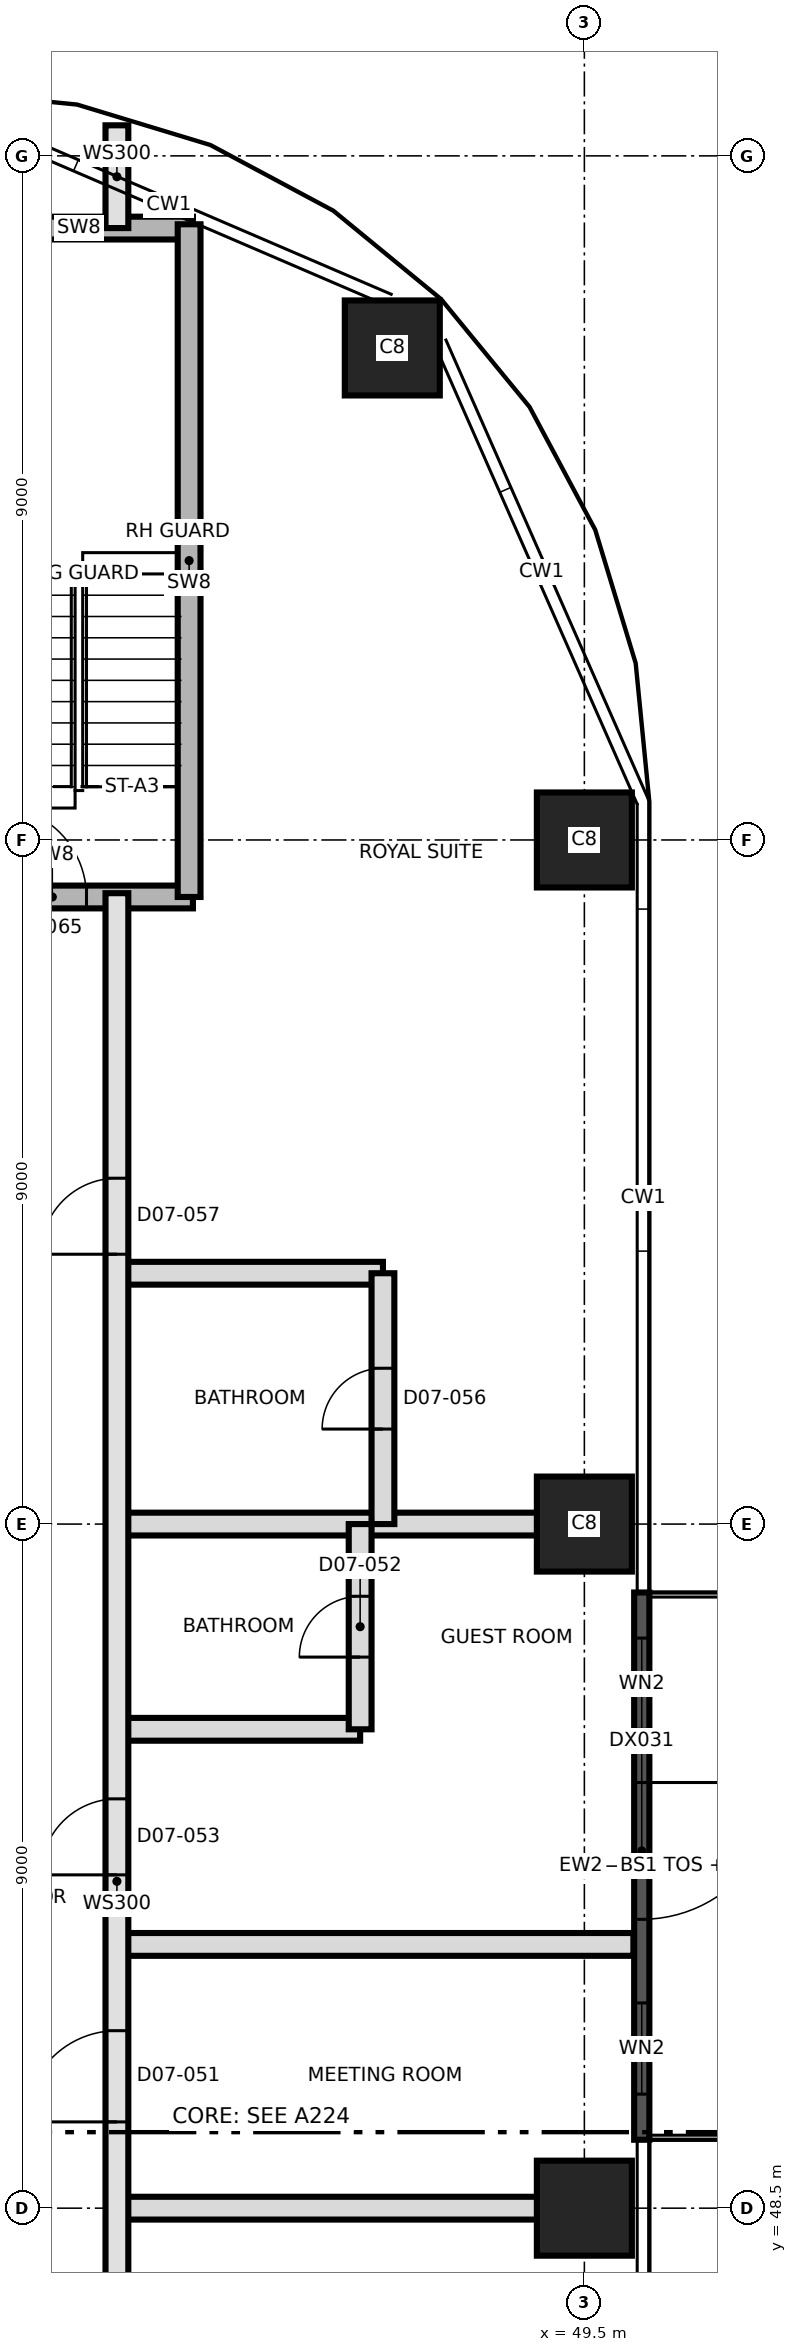
"""IFC4 building model, lengths in metres.
Left out: names, types, materials, properties, quantities, classifications, styles, units other than length and angle.
Written with IfcOpenShell. Run it as: python <this file> out.ifc"""

import sys

from ifc_helpers import new_model, si_unit, direction, frame, frame_2d, origin, origin_2d, place, context, subcontext, project, spatial, rectangle, extrude, element, fill, save


model = new_model("IFC4")
c1 = context("Model", 3, precision=1e-05, world=origin(), true_north=direction((0.0, 1.0)))
c2 = subcontext(c1, "Body", "Model", "MODEL_VIEW")
j1 = project(units=[si_unit("LENGTHUNIT", "METRE"), si_unit("PLANEANGLEUNIT", "RADIAN")], contexts=[c1])
p1 = place(None, origin())
s1 = spatial("IfcSite", under=j1, at=p1, CompositionType="ELEMENT")
p2 = place(p1, origin())
s2 = spatial("IfcBuilding", under=s1, at=p2, CompositionType="ELEMENT")
p3 = place(p2, frame((0.0, 0.0, 90.8)))
s3 = spatial("IfcBuildingStorey", under=s2, at=p3, CompositionType="ELEMENT", Elevation=90.8)
for number, where, z_axis, x_axis in (
    (1, (49.5, 48.5, 0.0), (0.0, 0.0, 1.0), (1.0, 0.0, 0.0)),
    (2, (49.5, 57.5, 0.0), (0.0, 0.0, 1.0), (1.0, 0.0, 0.0)),
    (3, (49.5, 66.5, 0.0), (0.0, 0.0, 1.0), (1.0, 0.0, 0.0)),
    (4, (46.973, 72.973, 0.0), (0.0, 0.0, 1.0), (1.0, 0.0, 0.0)),
):
    element("IfcColumn", number, at=place(p3, frame(where, z_axis=z_axis, x_axis=x_axis)), inside=s3, PredefinedType="COLUMN", context=c2, shape_type="SweptSolid", body=[
        extrude(rectangle(XDim=1.25, YDim=1.25, at=origin_2d()), origin(), (0.0, 0.0, 1.0), 3.7),
    ])
p4 = place(p3, frame((50.255, 56.6, 0.0), z_axis=(0.0, 0.0, 1.0), x_axis=(0.0, -1.0, 0.0)))
e5 = element("IfcWall", 5, at=p4, inside=s3, PredefinedType="SOLIDWALL", context=c2, shape_type="SweptSolid", body=[
    extrude(rectangle(XDim=7.2, YDim=0.2, at=frame_2d((3.6, 0.0))), origin(), (0.0, 0.0, 1.0), 3.4),
])
p5 = place(p4, frame((2.5, 0.0, 0.0)))
e6 = element("IfcOpeningElement", 6, at=p5, cuts=e5, PredefinedType="OPENING", context=c2, shape_type="SweptSolid", body=[
    extrude(rectangle(XDim=1.8, YDim=2.4, at=frame_2d((0.9, 1.2))), frame((0.0, 0.11, 0.0), z_axis=(0.0, -1.0, 0.0), x_axis=(1.0, 0.0, 0.0)), (0.0, 0.0, 1.0), 0.22),
])
p6 = place(p4, frame((5.4, 0.0, 0.9)))
e7 = element("IfcOpeningElement", 7, at=p6, cuts=e5, PredefinedType="OPENING", context=c2, shape_type="SweptSolid", body=[
    extrude(rectangle(XDim=1.2, YDim=2.1, at=frame_2d((0.6, 1.05))), frame((0.0, 0.11, 0.0), z_axis=(0.0, -1.0, 0.0), x_axis=(1.0, 0.0, 0.0)), (0.0, 0.0, 1.0), 0.22),
])
p7 = place(p4, frame((0.6, 0.0, 0.9)))
e8 = element("IfcOpeningElement", 8, at=p7, cuts=e5, PredefinedType="OPENING", context=c2, shape_type="SweptSolid", body=[
    extrude(rectangle(XDim=1.2, YDim=2.1, at=frame_2d((0.6, 1.05))), frame((0.0, 0.11, 0.0), z_axis=(0.0, -1.0, 0.0), x_axis=(1.0, 0.0, 0.0)), (0.0, 0.0, 1.0), 0.22),
])
p8 = place(p3, frame((43.35, 48.5, 0.0), z_axis=(0.0, 0.0, 1.0), x_axis=(1.0, 0.0, 0.0)))
e9 = element("IfcWall", 9, at=p8, inside=s3, PredefinedType="PARTITIONING", context=c2, shape_type="SweptSolid", body=[
    extrude(rectangle(XDim=6.655, YDim=0.3, at=frame_2d((3.327, 0.0))), origin(), (0.0, 0.0, 1.0), 3.4),
])
p9 = place(p3, frame((43.35, 51.97, 0.0), z_axis=(0.0, 0.0, 1.0), x_axis=(1.0, 0.0, 0.0)))
e10 = element("IfcWall", 10, at=p9, inside=s3, PredefinedType="PARTITIONING", context=c2, shape_type="SweptSolid", body=[
    extrude(rectangle(XDim=6.795, YDim=0.3, at=frame_2d((3.397, 0.0))), origin(), (0.0, 0.0, 1.0), 3.4),
])
p10 = place(p3, frame((43.35, 54.8, 0.0), z_axis=(0.0, 0.0, 1.0), x_axis=(1.0, 0.0, 0.0)))
e11 = element("IfcWall", 11, at=p10, inside=s3, PredefinedType="PARTITIONING", context=c2, shape_type="SweptSolid", body=[
    extrude(rectangle(XDim=3.2, YDim=0.3, at=frame_2d((1.6, 0.0))), origin(), (0.0, 0.0, 1.0), 3.4),
])
p11 = place(p3, frame((43.35, 57.5, 0.0), z_axis=(0.0, 0.0, 1.0), x_axis=(1.0, 0.0, 0.0)))
e12 = element("IfcWall", 12, at=p11, inside=s3, PredefinedType="PARTITIONING", context=c2, shape_type="SweptSolid", body=[
    extrude(rectangle(XDim=6.655, YDim=0.3, at=frame_2d((3.327, 0.0))), origin(), (0.0, 0.0, 1.0), 3.4),
])
p12 = place(p3, frame((43.35, 60.8, 0.0), z_axis=(0.0, 0.0, 1.0), x_axis=(1.0, 0.0, 0.0)))
e13 = element("IfcWall", 13, at=p12, inside=s3, PredefinedType="PARTITIONING", context=c2, shape_type="SweptSolid", body=[
    extrude(rectangle(XDim=3.5, YDim=0.3, at=frame_2d((1.75, 0.0))), origin(), (0.0, 0.0, 1.0), 3.4),
])
p13 = place(p3, frame((40.65, 65.75, 0.0), z_axis=(0.0, 0.0, 1.0), x_axis=(1.0, 0.0, 0.0)))
e14 = element("IfcWall", 14, at=p13, inside=s3, PredefinedType="SHEAR", context=c2, shape_type="SweptSolid", body=[
    extrude(rectangle(XDim=3.7, YDim=0.3, at=frame_2d((1.85, 0.0))), origin(), (0.0, 0.0, 1.0), 3.4),
])
p14 = place(p13, frame((1.1, 0.0, 0.0)))
e15 = element("IfcOpeningElement", 15, at=p14, cuts=e14, PredefinedType="OPENING", context=c2, shape_type="SweptSolid", body=[
    extrude(rectangle(XDim=1.2, YDim=2.1, at=frame_2d((0.6, 1.05))), frame((0.0, 0.16, 0.0), z_axis=(0.0, -1.0, 0.0), x_axis=(1.0, 0.0, 0.0)), (0.0, 0.0, 1.0), 0.32),
])
p15 = place(p3, frame((41.35, 74.55, 0.0), z_axis=(0.0, 0.0, 1.0), x_axis=(1.0, 0.0, 0.0)))
e16 = element("IfcWall", 16, at=p15, inside=s3, PredefinedType="SHEAR", context=c2, shape_type="SweptSolid", body=[
    extrude(rectangle(XDim=3.0, YDim=0.3, at=frame_2d((1.5, 0.0))), origin(), (0.0, 0.0, 1.0), 3.4),
])
p16 = place(p3, frame((43.35, 39.8, 0.0), z_axis=(0.0, 0.0, 1.0), x_axis=(0.0, 1.0, 0.0)))
e17 = element("IfcWall", 17, at=p16, inside=s3, PredefinedType="SOLIDWALL", context=c2, shape_type="SweptSolid", body=[
    extrude(rectangle(XDim=26.0, YDim=0.3, at=frame_2d((13.0, 0.0))), origin(), (0.0, 0.0, 1.0), 3.4),
])
p17 = place(p16, frame((3.115, 0.0, 0.0)))
e18 = element("IfcOpeningElement", 18, at=p17, cuts=e17, PredefinedType="OPENING", context=c2, shape_type="SweptSolid", body=[
    extrude(rectangle(XDim=1.0, YDim=2.1, at=frame_2d((0.5, 1.05))), frame((0.0, 0.16, 0.0), z_axis=(0.0, -1.0, 0.0), x_axis=(1.0, 0.0, 0.0)), (0.0, 0.0, 1.0), 0.32),
])
p18 = place(p16, frame((6.065, 0.0, 0.0)))
e19 = element("IfcOpeningElement", 19, at=p18, cuts=e17, PredefinedType="OPENING", context=c2, shape_type="SweptSolid", body=[
    extrude(rectangle(XDim=1.4, YDim=2.1, at=frame_2d((0.7, 1.05))), frame((0.0, 0.16, 0.0), z_axis=(0.0, -1.0, 0.0), x_axis=(1.0, 0.0, 0.0)), (0.0, 0.0, 1.0), 0.32),
])
p19 = place(p16, frame((9.835, 0.0, 0.0)))
e20 = element("IfcOpeningElement", 20, at=p19, cuts=e17, PredefinedType="OPENING", context=c2, shape_type="SweptSolid", body=[
    extrude(rectangle(XDim=1.2, YDim=2.1, at=frame_2d((0.6, 1.05))), frame((0.0, 0.16, 0.0), z_axis=(0.0, -1.0, 0.0), x_axis=(1.0, 0.0, 0.0)), (0.0, 0.0, 1.0), 0.32),
])
p20 = place(p16, frame((13.085, 0.0, 0.0)))
e21 = element("IfcOpeningElement", 21, at=p20, cuts=e17, PredefinedType="OPENING", context=c2, shape_type="SweptSolid", body=[
    extrude(rectangle(XDim=1.0, YDim=2.1, at=frame_2d((0.5, 1.05))), frame((0.0, 0.16, 0.0), z_axis=(0.0, -1.0, 0.0), x_axis=(1.0, 0.0, 0.0)), (0.0, 0.0, 1.0), 0.32),
])
p21 = place(p16, frame((21.25, 0.0, 0.0)))
e22 = element("IfcOpeningElement", 22, at=p21, cuts=e17, PredefinedType="OPENING", context=c2, shape_type="SweptSolid", body=[
    extrude(rectangle(XDim=1.0, YDim=2.4, at=frame_2d((0.5, 1.2))), frame((0.0, 0.16, 0.0), z_axis=(0.0, -1.0, 0.0), x_axis=(1.0, 0.0, 0.0)), (0.0, 0.0, 1.0), 0.32),
])
p22 = place(p3, frame((43.35, 74.55, 0.0), z_axis=(0.0, 0.0, 1.0), x_axis=(0.0, 1.0, 0.0)))
e23 = element("IfcWall", 23, at=p22, inside=s3, PredefinedType="SOLIDWALL", context=c2, shape_type="SweptSolid", body=[
    extrude(rectangle(XDim=1.352, YDim=0.3, at=frame_2d((0.676, 0.0))), origin(), (0.0, 0.0, 1.0), 3.4),
])
p23 = place(p3, frame((44.3, 65.75, 0.0), z_axis=(0.0, 0.0, 1.0), x_axis=(0.0, 1.0, 0.0)))
e24 = element("IfcWall", 24, at=p23, inside=s3, PredefinedType="SHEAR", context=c2, shape_type="SweptSolid", body=[
    extrude(rectangle(XDim=8.85, YDim=0.3, at=frame_2d((4.425, 0.0))), origin(), (0.0, 0.0, 1.0), 3.4),
])
p24 = place(p3, frame((46.55, 54.8, 0.0), z_axis=(0.0, 0.0, 1.0), x_axis=(0.0, 1.0, 0.0)))
e25 = element("IfcWall", 25, at=p24, inside=s3, PredefinedType="PARTITIONING", context=c2, shape_type="SweptSolid", body=[
    extrude(rectangle(XDim=2.7, YDim=0.3, at=frame_2d((1.35, 0.0))), origin(), (0.0, 0.0, 1.0), 3.4),
])
p25 = place(p24, frame((0.95, 0.0, 0.0)))
e26 = element("IfcOpeningElement", 26, at=p25, cuts=e25, PredefinedType="OPENING", context=c2, shape_type="SweptSolid", body=[
    extrude(rectangle(XDim=0.8, YDim=2.1, at=frame_2d((0.4, 1.05))), frame((0.0, 0.16, 0.0), z_axis=(0.0, -1.0, 0.0), x_axis=(1.0, 0.0, 0.0)), (0.0, 0.0, 1.0), 0.32),
])
p26 = place(p3, frame((46.85, 57.5, 0.0), z_axis=(0.0, 0.0, 1.0), x_axis=(0.0, 1.0, 0.0)))
e27 = element("IfcWall", 27, at=p26, inside=s3, PredefinedType="PARTITIONING", context=c2, shape_type="SweptSolid", body=[
    extrude(rectangle(XDim=3.3, YDim=0.3, at=frame_2d((1.65, 0.0))), origin(), (0.0, 0.0, 1.0), 3.4),
])
p27 = place(p26, frame((1.25, 0.0, 0.0)))
e28 = element("IfcOpeningElement", 28, at=p27, cuts=e27, PredefinedType="OPENING", context=c2, shape_type="SweptSolid", body=[
    extrude(rectangle(XDim=0.8, YDim=2.1, at=frame_2d((0.4, 1.05))), frame((0.0, 0.16, 0.0), z_axis=(0.0, -1.0, 0.0), x_axis=(1.0, 0.0, 0.0)), (0.0, 0.0, 1.0), 0.32),
])
p28 = place(p5, origin())
e29 = element("IfcDoor", 29, at=p28, inside=s3, OperationType="SINGLE_SWING_LEFT", PredefinedType="DOOR", context=c2, shape_type="SweptSolid", body=[
    extrude(rectangle(XDim=1.8, YDim=2.4, at=frame_2d((0.9, 1.2))), frame((0.0, 0.025, 0.0), z_axis=(0.0, -1.0, 0.0), x_axis=(1.0, 0.0, 0.0)), (0.0, 0.0, 1.0), 0.05),
])
fill(e6, e29)
p29 = place(p6, origin())
e30 = element("IfcWindow", 30, at=p29, inside=s3, PartitioningType="SINGLE_PANEL", PredefinedType="WINDOW", context=c2, shape_type="SweptSolid", body=[
    extrude(rectangle(XDim=1.2, YDim=2.1, at=frame_2d((0.6, 1.05))), frame((0.0, 0.03, 0.0), z_axis=(0.0, -1.0, 0.0), x_axis=(1.0, 0.0, 0.0)), (0.0, 0.0, 1.0), 0.06),
])
fill(e7, e30)
p30 = place(p7, origin())
e31 = element("IfcWindow", 31, at=p30, inside=s3, PartitioningType="SINGLE_PANEL", PredefinedType="WINDOW", context=c2, shape_type="SweptSolid", body=[
    extrude(rectangle(XDim=1.2, YDim=2.1, at=frame_2d((0.6, 1.05))), frame((0.0, 0.03, 0.0), z_axis=(0.0, -1.0, 0.0), x_axis=(1.0, 0.0, 0.0)), (0.0, 0.0, 1.0), 0.06),
])
fill(e8, e31)
p31 = place(p19, origin())
e32 = element("IfcDoor", 32, at=p31, inside=s3, OperationType="SINGLE_SWING_LEFT", PredefinedType="DOOR", context=c2, shape_type="SweptSolid", body=[
    extrude(rectangle(XDim=1.2, YDim=2.1, at=frame_2d((0.6, 1.05))), frame((0.0, 0.025, 0.0), z_axis=(0.0, -1.0, 0.0), x_axis=(1.0, 0.0, 0.0)), (0.0, 0.0, 1.0), 0.05),
])
fill(e20, e32)
p32 = place(p25, origin())
e33 = element("IfcDoor", 33, at=p32, inside=s3, OperationType="SINGLE_SWING_LEFT", PredefinedType="DOOR", context=c2, shape_type="SweptSolid", body=[
    extrude(rectangle(XDim=0.8, YDim=2.1, at=frame_2d((0.4, 1.05))), frame((0.0, 0.025, 0.0), z_axis=(0.0, -1.0, 0.0), x_axis=(1.0, 0.0, 0.0)), (0.0, 0.0, 1.0), 0.05),
])
fill(e26, e33)
p33 = place(p20, origin())
e34 = element("IfcDoor", 34, at=p33, inside=s3, OperationType="SINGLE_SWING_RIGHT", PredefinedType="DOOR", context=c2, shape_type="SweptSolid", body=[
    extrude(rectangle(XDim=1.0, YDim=2.1, at=frame_2d((0.5, 1.05))), frame((0.0, 0.025, 0.0), z_axis=(0.0, -1.0, 0.0), x_axis=(1.0, 0.0, 0.0)), (0.0, 0.0, 1.0), 0.05),
])
fill(e21, e34)
p34 = place(p27, origin())
e35 = element("IfcDoor", 35, at=p34, inside=s3, OperationType="SINGLE_SWING_LEFT", PredefinedType="DOOR", context=c2, shape_type="SweptSolid", body=[
    extrude(rectangle(XDim=0.8, YDim=2.1, at=frame_2d((0.4, 1.05))), frame((0.0, 0.025, 0.0), z_axis=(0.0, -1.0, 0.0), x_axis=(1.0, 0.0, 0.0)), (0.0, 0.0, 1.0), 0.05),
])
fill(e28, e35)
p35 = place(p21, origin())
e36 = element("IfcDoor", 36, at=p35, inside=s3, OperationType="SINGLE_SWING_LEFT", PredefinedType="DOOR", context=c2, shape_type="SweptSolid", body=[
    extrude(rectangle(XDim=1.0, YDim=2.4, at=frame_2d((0.5, 1.2))), frame((0.0, 0.025, 0.0), z_axis=(0.0, -1.0, 0.0), x_axis=(1.0, 0.0, 0.0)), (0.0, 0.0, 1.0), 0.05),
])
fill(e22, e36)
p36 = place(p14, origin())
e37 = element("IfcDoor", 37, at=p36, inside=s3, OperationType="SINGLE_SWING_RIGHT", PredefinedType="DOOR", context=c2, shape_type="SweptSolid", body=[
    extrude(rectangle(XDim=1.2, YDim=2.1, at=frame_2d((0.6, 1.05))), frame((0.0, 0.025, 0.0), z_axis=(0.0, -1.0, 0.0), x_axis=(1.0, 0.0, 0.0)), (0.0, 0.0, 1.0), 0.05),
])
fill(e15, e37)
save(model, sys.argv[1])
